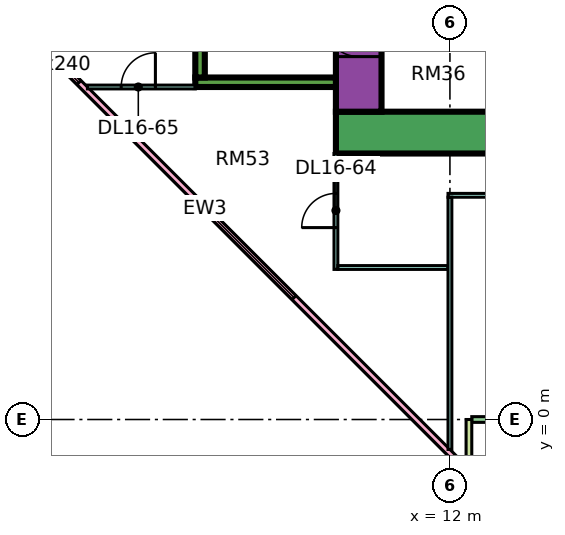
"""IFC4 building model, lengths in metres.
Left out: names, types, materials, properties, quantities, classifications, styles, units other than length and angle.
Written with IfcOpenShell. Run it as: python <this file> out.ifc"""

import sys

from ifc_helpers import new_model, si_unit, direction, frame, frame_2d, origin, place, context, subcontext, project, spatial, rectangle, extrude, element, fill, save


model = new_model("IFC4")
c1 = context("Model", 3, precision=1e-05, world=origin(), true_north=direction((0.0, 1.0)))
c2 = subcontext(c1, "Body", "Model", "MODEL_VIEW")
j1 = project(units=[si_unit("LENGTHUNIT", "METRE"), si_unit("PLANEANGLEUNIT", "RADIAN")], contexts=[c1])
p1 = place(None, origin())
s1 = spatial("IfcSite", under=j1, at=p1, CompositionType="ELEMENT")
p2 = place(p1, origin())
s2 = spatial("IfcBuilding", under=s1, at=p2, CompositionType="ELEMENT")
p3 = place(p2, frame((0.0, 0.0, 75.15)))
s3 = spatial("IfcBuildingStorey", under=s2, at=p3, CompositionType="ELEMENT", Elevation=75.15)
p4 = place(p3, frame((9.0, 7.55, 0.0), z_axis=(0.0, 0.0, 1.0), x_axis=(1.0, 0.0, 0.0)))
e1 = element("IfcWall", 1, at=p4, inside=s3, PredefinedType="SHEAR", context=c2, shape_type="SweptSolid", body=[
    extrude(rectangle(XDim=25.0, YDim=1.1, at=frame_2d((12.5, 0.0))), origin(), (0.0, 0.0, 1.0), 3.75),
])
p5 = place(p3, frame((9.6, 8.1, 0.0), z_axis=(0.0, 0.0, 1.0), x_axis=(0.0, 1.0, 0.0)))
e2 = element("IfcWall", 2, at=p5, inside=s3, PredefinedType="SHEAR", context=c2, shape_type="SweptSolid", body=[
    extrude(rectangle(XDim=10.8, YDim=1.2, at=frame_2d((5.4, 0.0))), origin(), (0.0, 0.0, 1.0), 3.75),
])
p6 = place(p5, frame((3.775, 0.0, 0.0)))
e3 = element("IfcOpeningElement", 3, at=p6, cuts=e2, PredefinedType="OPENING", context=c2, shape_type="SweptSolid", body=[
    extrude(rectangle(XDim=1.1, YDim=2.2, at=frame_2d((0.55, 1.1))), frame((0.0, 0.61, 0.0), z_axis=(0.0, -1.0, 0.0), x_axis=(1.0, 0.0, 0.0)), (0.0, 0.0, 1.0), 1.22),
])
p7 = place(p5, frame((6.275, 0.0, 0.0)))
e4 = element("IfcOpeningElement", 4, at=p7, cuts=e2, PredefinedType="OPENING", context=c2, shape_type="SweptSolid", body=[
    extrude(rectangle(XDim=1.1, YDim=2.2, at=frame_2d((0.55, 1.1))), frame((0.0, 0.61, 0.0), z_axis=(0.0, -1.0, 0.0), x_axis=(1.0, 0.0, 0.0)), (0.0, 0.0, 1.0), 1.22),
])
p8 = place(p5, frame((8.95, 0.0, 0.0)))
e5 = element("IfcOpeningElement", 5, at=p8, cuts=e2, PredefinedType="OPENING", context=c2, shape_type="SweptSolid", body=[
    extrude(rectangle(XDim=1.1, YDim=2.2, at=frame_2d((0.55, 1.1))), frame((0.0, 0.61, 0.0), z_axis=(0.0, -1.0, 0.0), x_axis=(1.0, 0.0, 0.0)), (0.0, 0.0, 1.0), 1.22),
])
p9 = place(p5, frame((1.45, 0.0, 0.0)))
e6 = element("IfcOpeningElement", 6, at=p9, cuts=e2, PredefinedType="OPENING", context=c2, shape_type="SweptSolid", body=[
    extrude(rectangle(XDim=0.9, YDim=2.1, at=frame_2d((0.45, 1.05))), frame((0.0, 0.61, 0.0), z_axis=(0.0, -1.0, 0.0), x_axis=(1.0, 0.0, 0.0)), (0.0, 0.0, 1.0), 1.22),
])
p10 = place(p3, frame((5.3, 8.875, 0.0), z_axis=(0.0, 0.0, 1.0), x_axis=(1.0, 0.0, 0.0)))
e7 = element("IfcWall", 7, at=p10, inside=s3, PredefinedType="SHEAR", context=c2, shape_type="SweptSolid", body=[
    extrude(rectangle(XDim=3.7, YDim=0.25, at=frame_2d((1.85, 0.0))), origin(), (0.0, 0.0, 1.0), 3.75),
])
p11 = place(p3, frame((5.425, 9.0, 0.0), z_axis=(0.0, 0.0, 1.0), x_axis=(0.0, 1.0, 0.0)))
e8 = element("IfcWall", 8, at=p11, inside=s3, PredefinedType="SHEAR", context=c2, shape_type="SweptSolid", body=[
    extrude(rectangle(XDim=4.0, YDim=0.25, at=frame_2d((2.0, 0.0))), origin(), (0.0, 0.0, 1.0), 3.75),
])
p12 = place(p3, frame((-1.447, 12.553, 0.0), z_axis=(0.0, 0.0, 1.0), x_axis=(0.707106781187, -0.707106781187, 0.0)))
e9 = element("IfcWall", 9, at=p12, inside=s3, PredefinedType="SOLIDWALL", context=c2, shape_type="SweptSolid", body=[
    extrude(rectangle(XDim=19.799, YDim=0.15, at=frame_2d((9.899, 0.0))), origin(), (0.0, 0.0, 1.0), 3.35),
])
p13 = place(p12, frame((2.212, 0.0, 0.45)))
e10 = element("IfcOpeningElement", 10, at=p13, cuts=e9, PredefinedType="OPENING", context=c2, shape_type="SweptSolid", body=[
    extrude(rectangle(XDim=3.0, YDim=2.4, at=frame_2d((1.5, 1.2))), frame((0.0, 0.085, 0.0), z_axis=(0.0, -1.0, 0.0), x_axis=(1.0, 0.0, 0.0)), (0.0, 0.0, 1.0), 0.17),
])
p14 = place(p12, frame((10.216, 0.0, 0.45)))
e11 = element("IfcOpeningElement", 11, at=p14, cuts=e9, PredefinedType="OPENING", context=c2, shape_type="SweptSolid", body=[
    extrude(rectangle(XDim=3.0, YDim=2.4, at=frame_2d((1.5, 1.2))), frame((0.0, 0.085, 0.0), z_axis=(0.0, -1.0, 0.0), x_axis=(1.0, 0.0, 0.0)), (0.0, 0.0, 1.0), 0.17),
])
p15 = place(p3, frame((12.575, 0.0, 0.0), z_axis=(0.0, 0.0, 1.0), x_axis=(1.0, 0.0, 0.0)))
e12 = element("IfcWall", 12, at=p15, inside=s3, PredefinedType="SOLIDWALL", context=c2, shape_type="SweptSolid", body=[
    extrude(rectangle(XDim=11.35, YDim=0.15, at=frame_2d((5.675, 0.0))), origin(), (0.0, 0.0, 1.0), 3.35),
])
p16 = place(p15, frame((3.312, 0.0, 0.0)))
e13 = element("IfcOpeningElement", 13, at=p16, cuts=e12, PredefinedType="OPENING", context=c2, shape_type="SweptSolid", body=[
    extrude(rectangle(XDim=1.8, YDim=2.4, at=frame_2d((0.9, 1.2))), frame((0.0, 0.085, 0.0), z_axis=(0.0, -1.0, 0.0), x_axis=(1.0, 0.0, 0.0)), (0.0, 0.0, 1.0), 0.17),
])
p17 = place(p15, frame((9.0, 0.0, 0.45)))
e14 = element("IfcOpeningElement", 14, at=p17, cuts=e12, PredefinedType="OPENING", context=c2, shape_type="SweptSolid", body=[
    extrude(rectangle(XDim=1.2, YDim=2.4, at=frame_2d((0.6, 1.2))), frame((0.0, 0.085, 0.0), z_axis=(0.0, -1.0, 0.0), x_axis=(1.0, 0.0, 0.0)), (0.0, 0.0, 1.0), 0.17),
])
p18 = place(p3, frame((12.5, -1.5, 0.0), z_axis=(0.0, 0.0, 1.0), x_axis=(0.0, 1.0, 0.0)))
e15 = element("IfcWall", 15, at=p18, inside=s3, PredefinedType="SOLIDWALL", context=c2, shape_type="SweptSolid", body=[
    extrude(rectangle(XDim=1.5, YDim=0.15, at=frame_2d((0.75, 0.0))), origin(), (0.0, 0.0, 1.0), 3.35),
])
p19 = place(p3, frame((2.461, 8.75, 0.0), z_axis=(0.0, 0.0, 1.0), x_axis=(1.0, 0.0, 0.0)))
e16 = element("IfcWall", 16, at=p19, inside=s3, PredefinedType="PARTITIONING", context=c2, shape_type="SweptSolid", body=[
    extrude(rectangle(XDim=2.839, YDim=0.1, at=frame_2d((1.419, 0.0))), origin(), (0.0, 0.0, 1.0), 3.35),
])
p20 = place(p19, frame((0.889, 0.0, 0.0)))
e17 = element("IfcOpeningElement", 17, at=p20, cuts=e16, PredefinedType="OPENING", context=c2, shape_type="SweptSolid", body=[
    extrude(rectangle(XDim=0.9, YDim=2.1, at=frame_2d((0.45, 1.05))), frame((0.0, 0.06, 0.0), z_axis=(0.0, -1.0, 0.0), x_axis=(1.0, 0.0, 0.0)), (0.0, 0.0, 1.0), 0.12),
])
p21 = place(p3, frame((9.0, 3.95, 0.0), z_axis=(0.0, 0.0, 1.0), x_axis=(0.0, 1.0, 0.0)))
e18 = element("IfcWall", 18, at=p21, inside=s3, PredefinedType="PARTITIONING", context=c2, shape_type="SweptSolid", body=[
    extrude(rectangle(XDim=3.05, YDim=0.1, at=frame_2d((1.525, 0.0))), origin(), (0.0, 0.0, 1.0), 3.35),
])
p22 = place(p21, frame((1.1, 0.0, 0.0)))
e19 = element("IfcOpeningElement", 19, at=p22, cuts=e18, PredefinedType="OPENING", context=c2, shape_type="SweptSolid", body=[
    extrude(rectangle(XDim=0.9, YDim=2.1, at=frame_2d((0.45, 1.05))), frame((0.0, 0.06, 0.0), z_axis=(0.0, -1.0, 0.0), x_axis=(1.0, 0.0, 0.0)), (0.0, 0.0, 1.0), 0.12),
])
p23 = place(p3, frame((9.05, 4.0, 0.0), z_axis=(0.0, 0.0, 1.0), x_axis=(1.0, 0.0, 0.0)))
e20 = element("IfcWall", 20, at=p23, inside=s3, PredefinedType="PARTITIONING", context=c2, shape_type="SweptSolid", body=[
    extrude(rectangle(XDim=2.9, YDim=0.1, at=frame_2d((1.45, 0.0))), origin(), (0.0, 0.0, 1.0), 3.35),
])
p24 = place(p3, frame((11.95, 5.9, 0.0), z_axis=(0.0, 0.0, 1.0), x_axis=(1.0, 0.0, 0.0)))
e21 = element("IfcWall", 21, at=p24, inside=s3, PredefinedType="PARTITIONING", context=c2, shape_type="SweptSolid", body=[
    extrude(rectangle(XDim=21.1, YDim=0.1, at=frame_2d((10.55, 0.0))), origin(), (0.0, 0.0, 1.0), 3.35),
])
p25 = place(p24, frame((10.1, 0.0, 0.0)))
e22 = element("IfcOpeningElement", 22, at=p25, cuts=e21, PredefinedType="OPENING", context=c2, shape_type="SweptSolid", body=[
    extrude(rectangle(XDim=0.9, YDim=2.1, at=frame_2d((0.45, 1.05))), frame((0.0, 0.06, 0.0), z_axis=(0.0, -1.0, 0.0), x_axis=(1.0, 0.0, 0.0)), (0.0, 0.0, 1.0), 0.12),
])
p26 = place(p24, frame((13.1, 0.0, 0.0)))
e23 = element("IfcOpeningElement", 23, at=p26, cuts=e21, PredefinedType="OPENING", context=c2, shape_type="SweptSolid", body=[
    extrude(rectangle(XDim=0.9, YDim=2.1, at=frame_2d((0.45, 1.05))), frame((0.0, 0.06, 0.0), z_axis=(0.0, -1.0, 0.0), x_axis=(1.0, 0.0, 0.0)), (0.0, 0.0, 1.0), 0.12),
])
p27 = place(p24, frame((16.1, 0.0, 0.0)))
e24 = element("IfcOpeningElement", 24, at=p27, cuts=e21, PredefinedType="OPENING", context=c2, shape_type="SweptSolid", body=[
    extrude(rectangle(XDim=0.9, YDim=2.1, at=frame_2d((0.45, 1.05))), frame((0.0, 0.06, 0.0), z_axis=(0.0, -1.0, 0.0), x_axis=(1.0, 0.0, 0.0)), (0.0, 0.0, 1.0), 0.12),
])
p28 = place(p24, frame((4.1, 0.0, 0.0)))
e25 = element("IfcOpeningElement", 25, at=p28, cuts=e21, PredefinedType="OPENING", context=c2, shape_type="SweptSolid", body=[
    extrude(rectangle(XDim=0.9, YDim=2.1, at=frame_2d((0.45, 1.05))), frame((0.0, 0.06, 0.0), z_axis=(0.0, -1.0, 0.0), x_axis=(1.0, 0.0, 0.0)), (0.0, 0.0, 1.0), 0.12),
])
p29 = place(p3, frame((12.0, -0.788, 0.0), z_axis=(0.0, 0.0, 1.0), x_axis=(0.0, 1.0, 0.0)))
e26 = element("IfcWall", 26, at=p29, inside=s3, PredefinedType="PARTITIONING", context=c2, shape_type="SweptSolid", body=[
    extrude(rectangle(XDim=6.638, YDim=0.1, at=frame_2d((3.319, 0.0))), origin(), (0.0, 0.0, 1.0), 3.35),
])
p30 = place(p13, origin())
e27 = element("IfcWindow", 27, at=p30, inside=s3, PartitioningType="SINGLE_PANEL", PredefinedType="WINDOW", context=c2, shape_type="SweptSolid", body=[
    extrude(rectangle(XDim=3.0, YDim=2.4, at=frame_2d((1.5, 1.2))), frame((0.0, 0.03, 0.0), z_axis=(0.0, -1.0, 0.0), x_axis=(1.0, 0.0, 0.0)), (0.0, 0.0, 1.0), 0.06),
])
fill(e10, e27)
p31 = place(p14, origin())
e28 = element("IfcWindow", 28, at=p31, inside=s3, PartitioningType="SINGLE_PANEL", PredefinedType="WINDOW", context=c2, shape_type="SweptSolid", body=[
    extrude(rectangle(XDim=3.0, YDim=2.4, at=frame_2d((1.5, 1.2))), frame((0.0, 0.03, 0.0), z_axis=(0.0, -1.0, 0.0), x_axis=(1.0, 0.0, 0.0)), (0.0, 0.0, 1.0), 0.06),
])
fill(e11, e28)
p32 = place(p9, frame((0.9, 0.0, 0.0), z_axis=(0.0, 0.0, 1.0), x_axis=(-1.0, 0.0, 0.0)))
e29 = element("IfcDoor", 29, at=p32, inside=s3, OperationType="SINGLE_SWING_RIGHT", PredefinedType="DOOR", context=c2, shape_type="SweptSolid", body=[
    extrude(rectangle(XDim=0.9, YDim=2.1, at=frame_2d((0.45, 1.05))), frame((0.0, 0.025, 0.0), z_axis=(0.0, -1.0, 0.0), x_axis=(1.0, 0.0, 0.0)), (0.0, 0.0, 1.0), 0.05),
])
fill(e6, e29)
p33 = place(p22, origin())
e30 = element("IfcDoor", 30, at=p33, inside=s3, OperationType="SINGLE_SWING_LEFT", PredefinedType="DOOR", context=c2, shape_type="SweptSolid", body=[
    extrude(rectangle(XDim=0.9, YDim=2.1, at=frame_2d((0.45, 1.05))), frame((0.0, 0.025, 0.0), z_axis=(0.0, -1.0, 0.0), x_axis=(1.0, 0.0, 0.0)), (0.0, 0.0, 1.0), 0.05),
])
fill(e19, e30)
p34 = place(p20, frame((0.9, 0.0, 0.0), z_axis=(0.0, 0.0, 1.0), x_axis=(-1.0, 0.0, 0.0)))
e31 = element("IfcDoor", 31, at=p34, inside=s3, OperationType="SINGLE_SWING_RIGHT", PredefinedType="DOOR", context=c2, shape_type="SweptSolid", body=[
    extrude(rectangle(XDim=0.9, YDim=2.1, at=frame_2d((0.45, 1.05))), frame((0.0, 0.025, 0.0), z_axis=(0.0, -1.0, 0.0), x_axis=(1.0, 0.0, 0.0)), (0.0, 0.0, 1.0), 0.05),
])
fill(e17, e31)
save(model, sys.argv[1])
